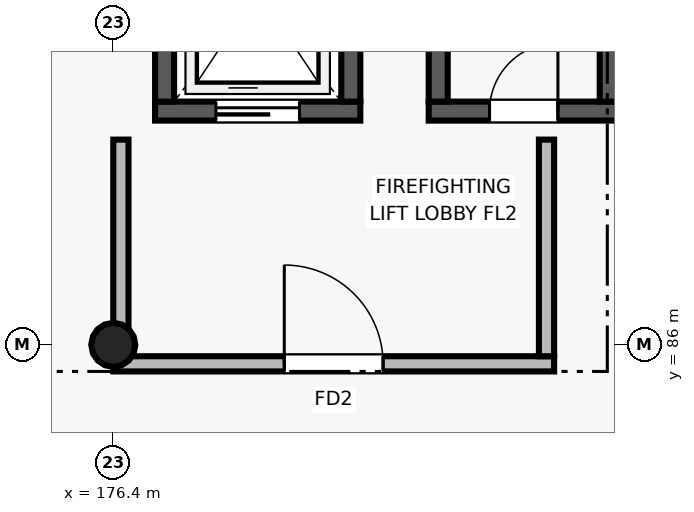
"""IFC4 building model, lengths in metres.
Left out: names, types, materials, properties, quantities, classifications, styles, units other than length and angle.
Written with IfcOpenShell. Run it as: python <this file> out.ifc"""

import sys

from ifc_helpers import new_model, si_unit, direction, frame, frame_2d, origin, origin_2d, place, context, subcontext, project, spatial, rectangle, circle, extrude, element, fill, save


model = new_model("IFC4")
c1 = context("Model", 3, precision=1e-05, world=origin(), true_north=direction((0.0, 1.0)))
c2 = subcontext(c1, "Body", "Model", "MODEL_VIEW")
j1 = project(units=[si_unit("LENGTHUNIT", "METRE"), si_unit("PLANEANGLEUNIT", "RADIAN")], contexts=[c1])
p1 = place(None, origin())
s1 = spatial("IfcSite", under=j1, at=p1, CompositionType="ELEMENT")
p2 = place(p1, origin())
s2 = spatial("IfcBuilding", under=s1, at=p2, CompositionType="ELEMENT")
p3 = place(p2, frame((0.0, 0.0, 17.4)))
s3 = spatial("IfcBuildingStorey", under=s2, at=p3, CompositionType="ELEMENT", Elevation=17.4)
p4 = place(p3, frame((176.4, 86.0, 0.0), z_axis=(0.0, 0.0, 1.0), x_axis=(1.0, 0.0, 0.0)))
e1 = element("IfcColumn", 1, at=p4, inside=s3, PredefinedType="COLUMN", context=c2, shape_type="SweptSolid", body=[
    extrude(circle(Radius=0.29, at=origin_2d()), origin(), (0.0, 0.0, 1.0), 4.2),
])
p5 = place(p3, frame((176.95, 89.075, 0.0), z_axis=(0.0, 0.0, 1.0), x_axis=(1.0, 0.0, 0.0)))
e2 = element("IfcWall", 2, at=p5, inside=s3, PredefinedType="SHEAR", context=c2, shape_type="SweptSolid", body=[
    extrude(rectangle(XDim=2.7, YDim=0.25, at=frame_2d((1.35, 0.0))), origin(), (0.0, 0.0, 1.0), 3.92),
])
p6 = place(p5, frame((0.8, 0.0, 0.0)))
e3 = element("IfcOpeningElement", 3, at=p6, cuts=e2, PredefinedType="OPENING", context=c2, shape_type="SweptSolid", body=[
    extrude(rectangle(XDim=1.1, YDim=2.15, at=frame_2d((0.55, 1.075))), frame((0.0, 0.135, 0.0), z_axis=(0.0, -1.0, 0.0), x_axis=(1.0, 0.0, 0.0)), (0.0, 0.0, 1.0), 0.27),
])
for number, where, z_axis, x_axis in (
    (4, (177.075, 89.2, 0.0), (0.0, 0.0, 1.0), (0.0, 1.0, 0.0)),
    (5, (179.525, 89.2, 0.0), (0.0, 0.0, 1.0), (0.0, 1.0, 0.0)),
):
    element("IfcWall", number, at=place(p3, frame(where, z_axis=z_axis, x_axis=x_axis)), inside=s3, PredefinedType="SHEAR", context=c2, shape_type="SweptSolid", body=[
        extrude(rectangle(XDim=2.9, YDim=0.25, at=frame_2d((1.45, 0.0))), origin(), (0.0, 0.0, 1.0), 3.92),
    ])
p7 = place(p3, frame((176.4, 85.75, 0.0), z_axis=(0.0, 0.0, 1.0), x_axis=(1.0, 0.0, 0.0)))
e6 = element("IfcWall", 6, at=p7, inside=s3, PredefinedType="SOLIDWALL", context=c2, shape_type="SweptSolid", body=[
    extrude(rectangle(XDim=5.8, YDim=0.2, at=frame_2d((2.9, 0.0))), origin(), (0.0, 0.0, 1.0), 3.92),
])
p8 = place(p7, frame((2.25, 0.0, 0.0)))
e7 = element("IfcOpeningElement", 7, at=p8, cuts=e6, PredefinedType="OPENING", context=c2, shape_type="SweptSolid", body=[
    extrude(rectangle(XDim=1.3, YDim=2.2, at=frame_2d((0.65, 1.1))), frame((0.0, 0.11, 0.0), z_axis=(0.0, -1.0, 0.0), x_axis=(1.0, 0.0, 0.0)), (0.0, 0.0, 1.0), 0.22),
])
p9 = place(p3, frame((176.5, 85.85, 0.0), z_axis=(0.0, 0.0, 1.0), x_axis=(0.0, 1.0, 0.0)))
e8 = element("IfcWall", 8, at=p9, inside=s3, PredefinedType="SOLIDWALL", context=c2, shape_type="SweptSolid", body=[
    extrude(rectangle(XDim=2.85, YDim=0.2, at=frame_2d((1.425, 0.0))), origin(), (0.0, 0.0, 1.0), 3.49),
])
p10 = place(p3, frame((182.1, 85.85, 0.0), z_axis=(0.0, 0.0, 1.0), x_axis=(0.0, 1.0, 0.0)))
e9 = element("IfcWall", 9, at=p10, inside=s3, PredefinedType="SOLIDWALL", context=c2, shape_type="SweptSolid", body=[
    extrude(rectangle(XDim=2.85, YDim=0.2, at=frame_2d((1.425, 0.0))), origin(), (0.0, 0.0, 1.0), 3.92),
])
p11 = place(p3, frame((180.55, 89.075, 0.0), z_axis=(0.0, 0.0, 1.0), x_axis=(1.0, 0.0, 0.0)))
e10 = element("IfcWall", 10, at=p11, inside=s3, PredefinedType="SHEAR", context=c2, shape_type="SweptSolid", body=[
    extrude(rectangle(XDim=2.5, YDim=0.25, at=frame_2d((1.25, 0.0))), origin(), (0.0, 0.0, 1.0), 3.92),
])
p12 = place(p11, frame((0.8, 0.0, 0.0)))
e11 = element("IfcOpeningElement", 11, at=p12, cuts=e10, PredefinedType="OPENING", context=c2, shape_type="SweptSolid", body=[
    extrude(rectangle(XDim=0.9, YDim=2.05, at=frame_2d((0.45, 1.025))), frame((0.0, 0.135, 0.0), z_axis=(0.0, -1.0, 0.0), x_axis=(1.0, 0.0, 0.0)), (0.0, 0.0, 1.0), 0.27),
])
for number, where, z_axis, x_axis in (
    (12, (180.675, 89.2, 0.0), (0.0, 0.0, 1.0), (0.0, 1.0, 0.0)),
    (13, (182.925, 89.2, 0.0), (0.0, 0.0, 1.0), (0.0, 1.0, 0.0)),
):
    element("IfcWall", number, at=place(p3, frame(where, z_axis=z_axis, x_axis=x_axis)), inside=s3, PredefinedType="SHEAR", context=c2, shape_type="SweptSolid", body=[
        extrude(rectangle(XDim=2.9, YDim=0.25, at=frame_2d((1.45, 0.0))), origin(), (0.0, 0.0, 1.0), 3.92),
    ])
p13 = place(p8, origin())
e14 = element("IfcDoor", 14, at=p13, inside=s3, OperationType="SINGLE_SWING_LEFT", PredefinedType="DOOR", context=c2, shape_type="SweptSolid", body=[
    extrude(rectangle(XDim=1.3, YDim=2.2, at=frame_2d((0.65, 1.1))), frame((0.0, 0.025, 0.0), z_axis=(0.0, -1.0, 0.0), x_axis=(1.0, 0.0, 0.0)), (0.0, 0.0, 1.0), 0.05),
])
fill(e7, e14)
p14 = place(p12, origin())
e15 = element("IfcDoor", 15, at=p14, inside=s3, OperationType="SINGLE_SWING_RIGHT", PredefinedType="DOOR", context=c2, shape_type="SweptSolid", body=[
    extrude(rectangle(XDim=0.9, YDim=2.05, at=frame_2d((0.45, 1.025))), frame((0.0, 0.025, 0.0), z_axis=(0.0, -1.0, 0.0), x_axis=(1.0, 0.0, 0.0)), (0.0, 0.0, 1.0), 0.05),
])
fill(e11, e15)
p15 = place(p6, origin())
e16 = element("IfcDoor", 16, at=p15, inside=s3, OperationType="SLIDING_TO_LEFT", PredefinedType="DOOR", context=c2, shape_type="SweptSolid", body=[
    extrude(rectangle(XDim=1.1, YDim=2.15, at=frame_2d((0.55, 1.075))), frame((0.0, 0.025, 0.0), z_axis=(0.0, -1.0, 0.0), x_axis=(1.0, 0.0, 0.0)), (0.0, 0.0, 1.0), 0.05),
])
fill(e3, e16)
save(model, sys.argv[1])
